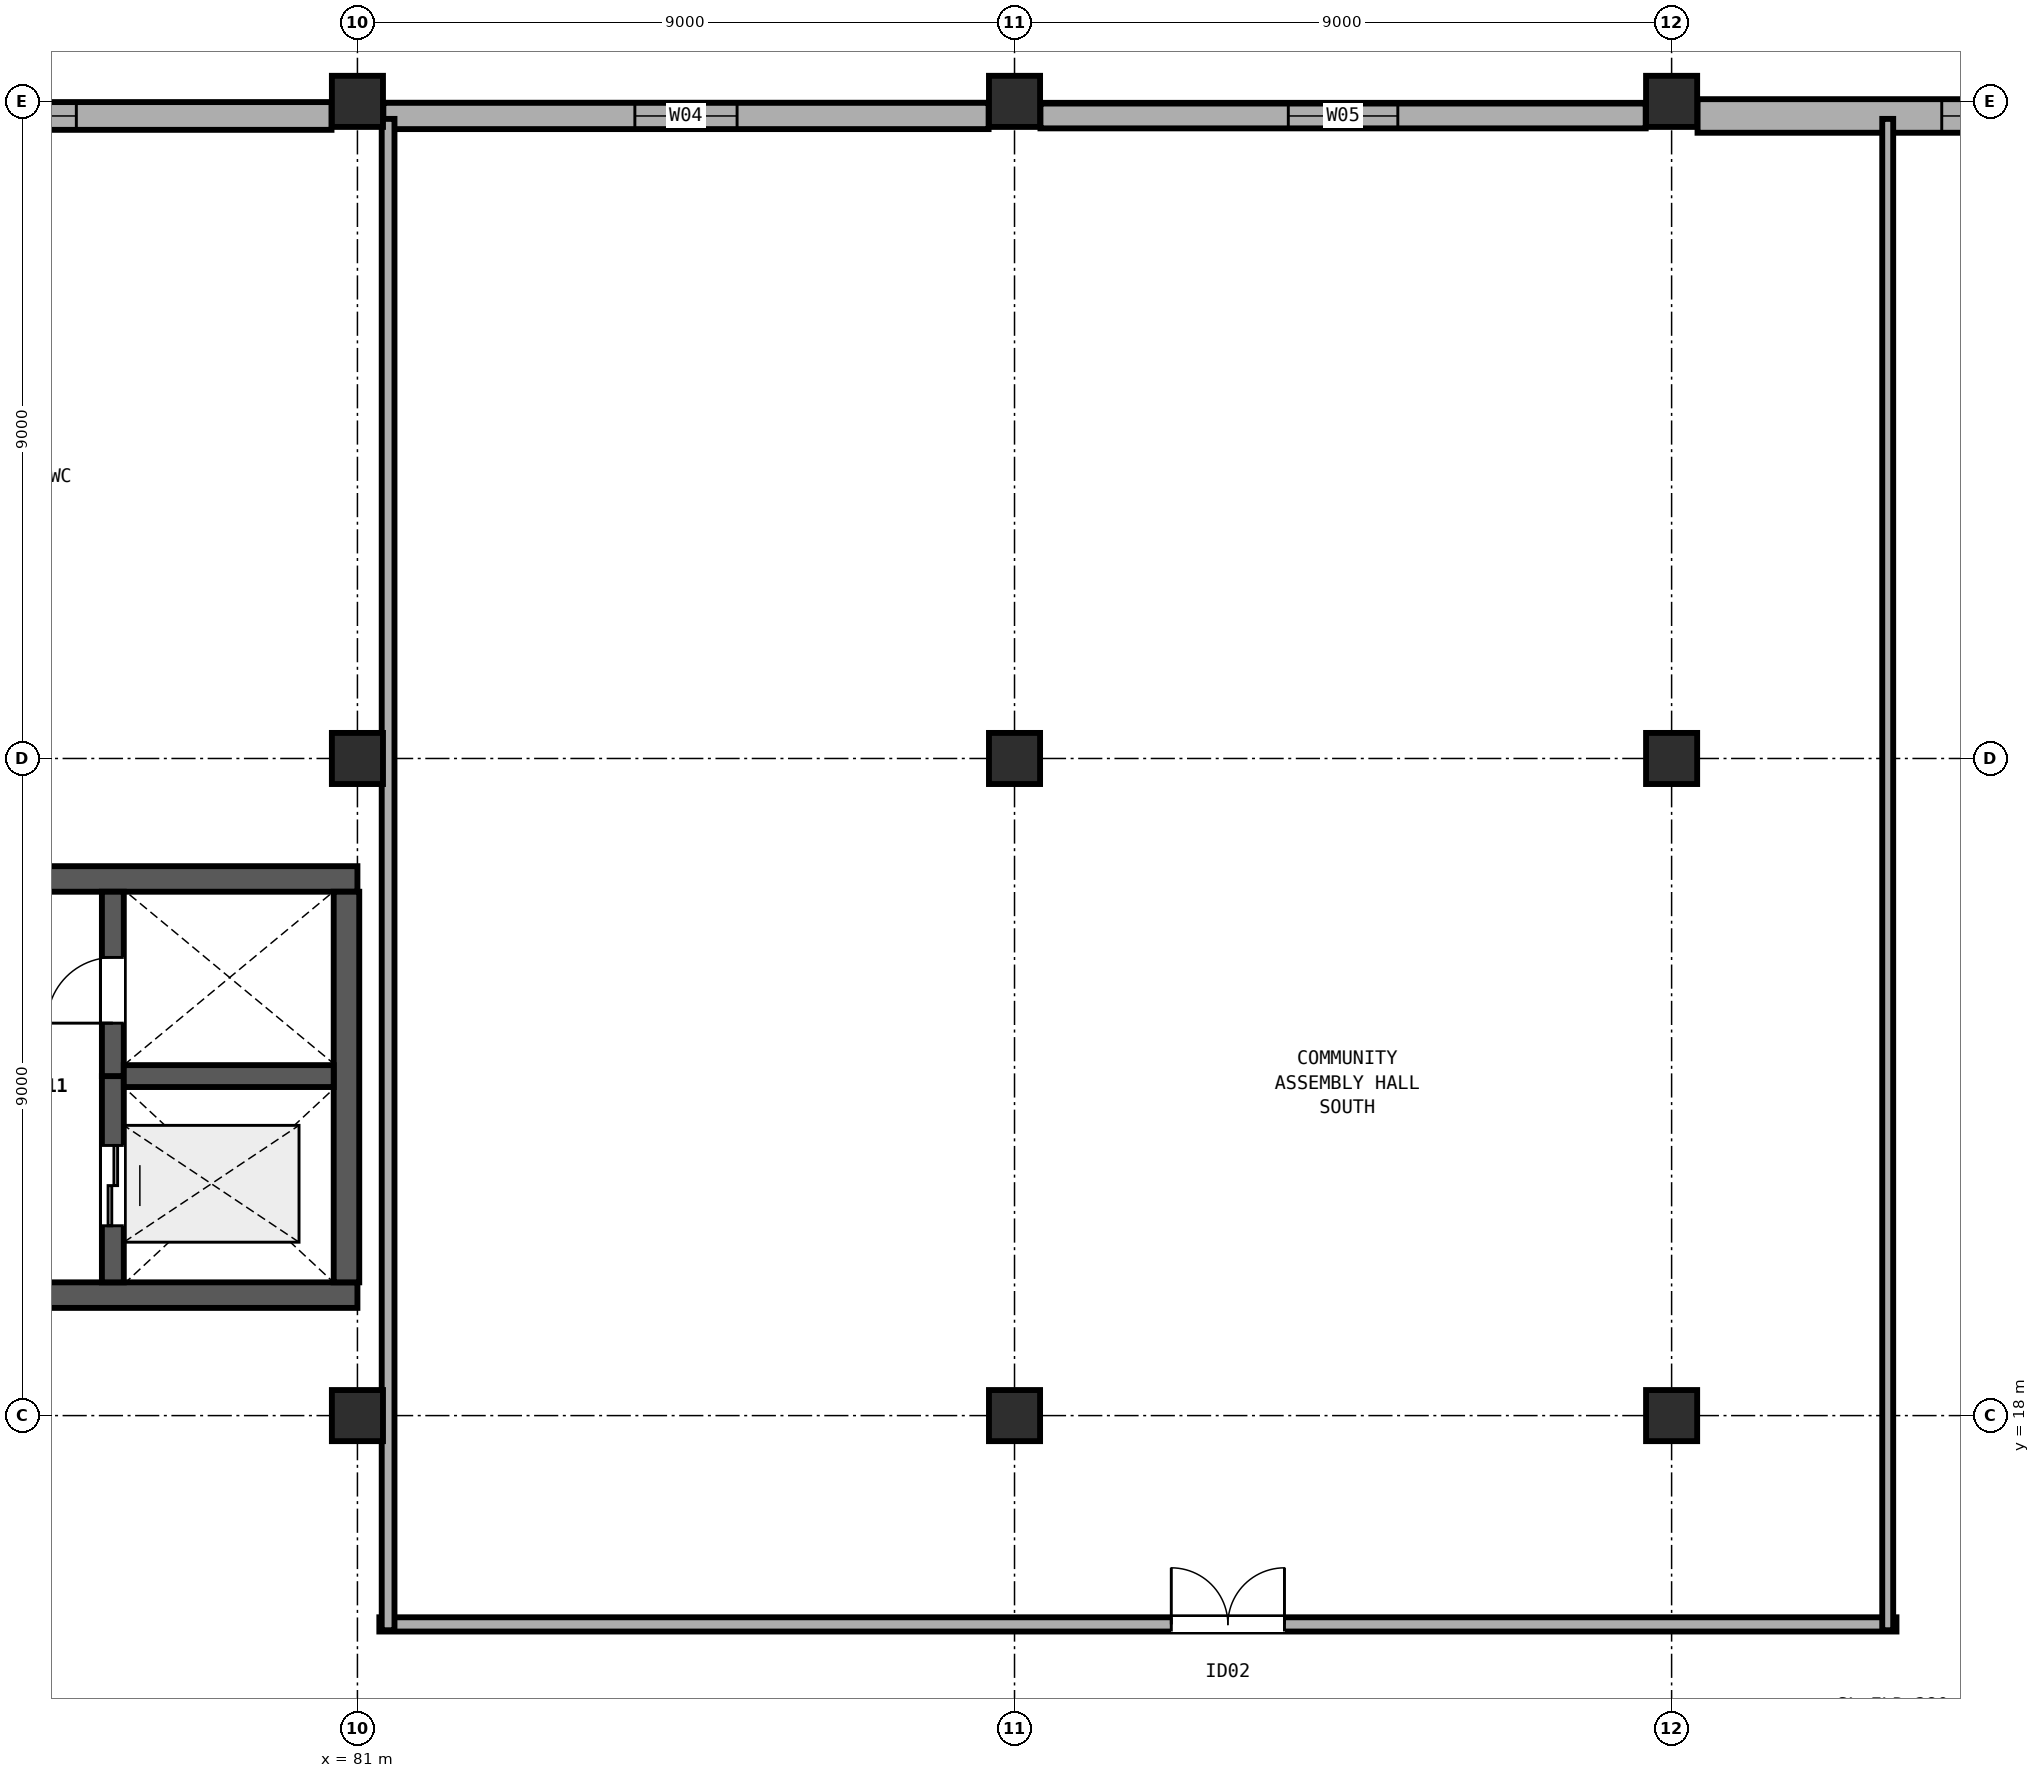
"""IFC4 building model, lengths in metres.
Left out: names, types, materials, properties, quantities, classifications, styles, units other than length and angle.
Written with IfcOpenShell. Run it as: python <this file> out.ifc"""

import sys

from ifc_helpers import new_model, si_unit, direction, frame, frame_2d, origin, origin_2d, place, context, subcontext, project, spatial, rectangle, extrude, element, fill, save


model = new_model("IFC4")
c1 = context("Model", 3, precision=1e-05, world=origin(), true_north=direction((0.0, 1.0)))
c2 = subcontext(c1, "Body", "Model", "MODEL_VIEW")
j1 = project(units=[si_unit("LENGTHUNIT", "METRE"), si_unit("PLANEANGLEUNIT", "RADIAN")], contexts=[c1])
p1 = place(None, origin())
s1 = spatial("IfcSite", under=j1, at=p1, CompositionType="ELEMENT")
p2 = place(p1, origin())
s2 = spatial("IfcBuilding", under=s1, at=p2, CompositionType="ELEMENT")
p3 = place(p2, frame((0.0, 0.0, 9.6)))
s3 = spatial("IfcBuildingStorey", under=s2, at=p3, CompositionType="ELEMENT", Elevation=9.6)
for number, where, z_axis, x_axis in (
    (1, (81.0, 18.0, 0.0), (0.0, 0.0, 1.0), (1.0, 0.0, 0.0)),
    (2, (81.0, 27.0, 0.0), (0.0, 0.0, 1.0), (1.0, 0.0, 0.0)),
    (3, (81.0, 36.0, 0.0), (0.0, 0.0, 1.0), (1.0, 0.0, 0.0)),
    (4, (90.0, 18.0, 0.0), (0.0, 0.0, 1.0), (1.0, 0.0, 0.0)),
    (5, (90.0, 27.0, 0.0), (0.0, 0.0, 1.0), (1.0, 0.0, 0.0)),
    (6, (90.0, 36.0, 0.0), (0.0, 0.0, 1.0), (1.0, 0.0, 0.0)),
    (7, (99.0, 18.0, 0.0), (0.0, 0.0, 1.0), (1.0, 0.0, 0.0)),
    (8, (99.0, 27.0, 0.0), (0.0, 0.0, 1.0), (1.0, 0.0, 0.0)),
    (9, (99.0, 36.0, 0.0), (0.0, 0.0, 1.0), (1.0, 0.0, 0.0)),
):
    element("IfcColumn", number, at=place(p3, frame(where, z_axis=z_axis, x_axis=x_axis)), inside=s3, PredefinedType="COLUMN", context=c2, shape_type="SweptSolid", body=[
        extrude(rectangle(XDim=0.7, YDim=0.7, at=origin_2d()), origin(), (0.0, 0.0, 1.0), 4.8),
    ])
p4 = place(p3, frame((63.0, 19.65, 0.0), z_axis=(0.0, 0.0, 1.0), x_axis=(1.0, 0.0, 0.0)))
e10 = element("IfcWall", 10, at=p4, inside=s3, PredefinedType="SHEAR", context=c2, shape_type="SweptSolid", body=[
    extrude(rectangle(XDim=18.0, YDim=0.35, at=frame_2d((9.0, 0.0))), origin(), (0.0, 0.0, 1.0), 4.5),
])
p5 = place(p4, frame((11.4, 0.0, 0.0)))
e11 = element("IfcOpeningElement", 11, at=p5, cuts=e10, PredefinedType="OPENING", context=c2, shape_type="SweptSolid", body=[
    extrude(rectangle(XDim=1.9, YDim=2.25, at=frame_2d((0.95, 1.125))), frame((0.0, 0.185, 0.0), z_axis=(0.0, -1.0, 0.0), x_axis=(1.0, 0.0, 0.0)), (0.0, 0.0, 1.0), 0.37),
])
p6 = place(p3, frame((81.0, 25.35, 0.0), z_axis=(0.0, 0.0, 1.0), x_axis=(-1.0, 0.0, 0.0)))
e12 = element("IfcWall", 12, at=p6, inside=s3, PredefinedType="SHEAR", context=c2, shape_type="SweptSolid", body=[
    extrude(rectangle(XDim=18.0, YDim=0.35, at=frame_2d((9.0, 0.0))), origin(), (0.0, 0.0, 1.0), 4.5),
])
p7 = place(p3, frame((80.85, 19.825, 0.0), z_axis=(0.0, 0.0, 1.0), x_axis=(0.0, 1.0, 0.0)))
e13 = element("IfcWall", 13, at=p7, inside=s3, PredefinedType="SHEAR", context=c2, shape_type="SweptSolid", body=[
    extrude(rectangle(XDim=5.35, YDim=0.35, at=frame_2d((2.675, 0.0))), origin(), (0.0, 0.0, 1.0), 4.5),
])
p8 = place(p3, frame((77.65, 19.825, 0.0), z_axis=(0.0, 0.0, 1.0), x_axis=(0.0, 1.0, 0.0)))
e14 = element("IfcWall", 14, at=p8, inside=s3, PredefinedType="SHEAR", context=c2, shape_type="SweptSolid", body=[
    extrude(rectangle(XDim=2.825, YDim=0.3, at=frame_2d((1.413, 0.0))), origin(), (0.0, 0.0, 1.0), 4.5),
])
p9 = place(p8, frame((0.775, 0.0, 0.0)))
e15 = element("IfcOpeningElement", 15, at=p9, cuts=e14, PredefinedType="OPENING", context=c2, shape_type="SweptSolid", body=[
    extrude(rectangle(XDim=1.1, YDim=2.1, at=frame_2d((0.55, 1.05))), frame((0.0, 0.16, 0.0), z_axis=(0.0, -1.0, 0.0), x_axis=(1.0, 0.0, 0.0)), (0.0, 0.0, 1.0), 0.32),
])
p10 = place(p3, frame((77.65, 22.65, 0.0), z_axis=(0.0, 0.0, 1.0), x_axis=(0.0, 1.0, 0.0)))
e16 = element("IfcWall", 16, at=p10, inside=s3, PredefinedType="SHEAR", context=c2, shape_type="SweptSolid", body=[
    extrude(rectangle(XDim=2.525, YDim=0.3, at=frame_2d((1.263, 0.0))), origin(), (0.0, 0.0, 1.0), 4.5),
])
p11 = place(p10, frame((0.725, 0.0, 0.0)))
e17 = element("IfcOpeningElement", 17, at=p11, cuts=e16, PredefinedType="OPENING", context=c2, shape_type="SweptSolid", body=[
    extrude(rectangle(XDim=0.9, YDim=2.1, at=frame_2d((0.45, 1.05))), frame((0.0, 0.16, 0.0), z_axis=(0.0, -1.0, 0.0), x_axis=(1.0, 0.0, 0.0)), (0.0, 0.0, 1.0), 0.32),
])
p12 = place(p3, frame((77.8, 22.65, 0.0), z_axis=(0.0, 0.0, 1.0), x_axis=(1.0, 0.0, 0.0)))
e18 = element("IfcWall", 18, at=p12, inside=s3, PredefinedType="SHEAR", context=c2, shape_type="SweptSolid", body=[
    extrude(rectangle(XDim=2.875, YDim=0.3, at=frame_2d((1.438, 0.0))), origin(), (0.0, 0.0, 1.0), 4.5),
])
p13 = place(p3, frame((72.355, 35.8, 0.0), z_axis=(0.0, 0.0, 1.0), x_axis=(1.0, 0.0, 0.0)))
e19 = element("IfcWall", 19, at=p13, inside=s3, PredefinedType="SOLIDWALL", context=c2, shape_type="SweptSolid", body=[
    extrude(rectangle(XDim=8.29, YDim=0.38, at=frame_2d((4.145, 0.0))), origin(), (0.0, 0.0, 1.0), 3.58),
])
p14 = place(p13, frame((3.495, 0.0, 0.9)))
e20 = element("IfcOpeningElement", 20, at=p14, cuts=e19, PredefinedType="OPENING", context=c2, shape_type="SweptSolid", body=[
    extrude(rectangle(XDim=1.3, YDim=1.5, at=frame_2d((0.65, 0.75))), frame((0.0, 0.2, 0.0), z_axis=(0.0, -1.0, 0.0), x_axis=(1.0, 0.0, 0.0)), (0.0, 0.0, 1.0), 0.4),
])
p15 = place(p3, frame((81.355, 35.8, 0.0), z_axis=(0.0, 0.0, 1.0), x_axis=(1.0, 0.0, 0.0)))
e21 = element("IfcWall", 21, at=p15, inside=s3, PredefinedType="SOLIDWALL", context=c2, shape_type="SweptSolid", body=[
    extrude(rectangle(XDim=8.29, YDim=0.36, at=frame_2d((4.145, 0.0))), origin(), (0.0, 0.0, 1.0), 3.58),
])
p16 = place(p15, frame((3.445, 0.0, 0.9)))
e22 = element("IfcOpeningElement", 22, at=p16, cuts=e21, PredefinedType="OPENING", context=c2, shape_type="SweptSolid", body=[
    extrude(rectangle(XDim=1.4, YDim=1.55, at=frame_2d((0.7, 0.775))), frame((0.0, 0.19, 0.0), z_axis=(0.0, -1.0, 0.0), x_axis=(1.0, 0.0, 0.0)), (0.0, 0.0, 1.0), 0.38),
])
p17 = place(p3, frame((90.355, 35.8, 0.0), z_axis=(0.0, 0.0, 1.0), x_axis=(1.0, 0.0, 0.0)))
e23 = element("IfcWall", 23, at=p17, inside=s3, PredefinedType="SOLIDWALL", context=c2, shape_type="SweptSolid", body=[
    extrude(rectangle(XDim=8.29, YDim=0.34, at=frame_2d((4.145, 0.0))), origin(), (0.0, 0.0, 1.0), 3.58),
])
p18 = place(p17, frame((3.395, 0.0, 0.9)))
e24 = element("IfcOpeningElement", 24, at=p18, cuts=e23, PredefinedType="OPENING", context=c2, shape_type="SweptSolid", body=[
    extrude(rectangle(XDim=1.5, YDim=1.6, at=frame_2d((0.75, 0.8))), frame((0.0, 0.18, 0.0), z_axis=(0.0, -1.0, 0.0), x_axis=(1.0, 0.0, 0.0)), (0.0, 0.0, 1.0), 0.36),
])
p19 = place(p3, frame((99.355, 35.8, 0.0), z_axis=(0.0, 0.0, 1.0), x_axis=(1.0, 0.0, 0.0)))
e25 = element("IfcWall", 25, at=p19, inside=s3, PredefinedType="SOLIDWALL", context=c2, shape_type="SweptSolid", body=[
    extrude(rectangle(XDim=8.29, YDim=0.46, at=frame_2d((4.145, 0.0))), origin(), (0.0, 0.0, 1.0), 3.58),
])
p20 = place(p19, frame((3.345, 0.0, 0.9)))
e26 = element("IfcOpeningElement", 26, at=p20, cuts=e25, PredefinedType="OPENING", context=c2, shape_type="SweptSolid", body=[
    extrude(rectangle(XDim=1.6, YDim=1.65, at=frame_2d((0.8, 0.825))), frame((0.0, 0.24, 0.0), z_axis=(0.0, -1.0, 0.0), x_axis=(1.0, 0.0, 0.0)), (0.0, 0.0, 1.0), 0.48),
])
p21 = place(p3, frame((81.3, 15.14, 0.0), z_axis=(0.0, 0.0, 1.0), x_axis=(1.0, 0.0, 0.0)))
e27 = element("IfcWall", 27, at=p21, inside=s3, PredefinedType="PARTITIONING", context=c2, shape_type="SweptSolid", body=[
    extrude(rectangle(XDim=20.78, YDim=0.195, at=frame_2d((10.39, 0.0))), origin(), (0.0, 0.0, 1.0), 3.56),
])
p22 = place(p21, frame((10.847, 0.0, 0.0)))
e28 = element("IfcOpeningElement", 28, at=p22, cuts=e27, PredefinedType="OPENING", context=c2, shape_type="SweptSolid", body=[
    extrude(rectangle(XDim=1.55, YDim=2.2, at=frame_2d((0.775, 1.1))), frame((0.0, 0.107, 0.0), z_axis=(0.0, -1.0, 0.0), x_axis=(1.0, 0.0, 0.0)), (0.0, 0.0, 1.0), 0.215),
])
p23 = place(p3, frame((81.42, 15.06, 0.0), z_axis=(0.0, 0.0, 1.0), x_axis=(0.0, 1.0, 0.0)))
e29 = element("IfcWall", 29, at=p23, inside=s3, PredefinedType="PARTITIONING", context=c2, shape_type="SweptSolid", body=[
    extrude(rectangle(XDim=20.7, YDim=0.175, at=frame_2d((10.35, 0.0))), origin(), (0.0, 0.0, 1.0), 3.56),
])
p24 = place(p3, frame((101.96, 35.76, 0.0), z_axis=(0.0, 0.0, 1.0), x_axis=(0.0, -1.0, 0.0)))
e30 = element("IfcWall", 30, at=p24, inside=s3, PredefinedType="PARTITIONING", context=c2, shape_type="SweptSolid", body=[
    extrude(rectangle(XDim=20.7, YDim=0.15, at=frame_2d((10.35, 0.0))), origin(), (0.0, 0.0, 1.0), 3.56),
])
p25 = place(p14, origin())
e31 = element("IfcWindow", 31, at=p25, inside=s3, PartitioningType="SINGLE_PANEL", PredefinedType="WINDOW", context=c2, shape_type="SweptSolid", body=[
    extrude(rectangle(XDim=1.3, YDim=1.5, at=frame_2d((0.65, 0.75))), frame((0.0, 0.03, 0.0), z_axis=(0.0, -1.0, 0.0), x_axis=(1.0, 0.0, 0.0)), (0.0, 0.0, 1.0), 0.06),
])
fill(e20, e31)
p26 = place(p16, origin())
e32 = element("IfcWindow", 32, at=p26, inside=s3, PartitioningType="SINGLE_PANEL", PredefinedType="WINDOW", context=c2, shape_type="SweptSolid", body=[
    extrude(rectangle(XDim=1.4, YDim=1.55, at=frame_2d((0.7, 0.775))), frame((0.0, 0.03, 0.0), z_axis=(0.0, -1.0, 0.0), x_axis=(1.0, 0.0, 0.0)), (0.0, 0.0, 1.0), 0.06),
])
fill(e22, e32)
p27 = place(p18, origin())
e33 = element("IfcWindow", 33, at=p27, inside=s3, PartitioningType="SINGLE_PANEL", PredefinedType="WINDOW", context=c2, shape_type="SweptSolid", body=[
    extrude(rectangle(XDim=1.5, YDim=1.6, at=frame_2d((0.75, 0.8))), frame((0.0, 0.03, 0.0), z_axis=(0.0, -1.0, 0.0), x_axis=(1.0, 0.0, 0.0)), (0.0, 0.0, 1.0), 0.06),
])
fill(e24, e33)
p28 = place(p20, origin())
e34 = element("IfcWindow", 34, at=p28, inside=s3, PartitioningType="SINGLE_PANEL", PredefinedType="WINDOW", context=c2, shape_type="SweptSolid", body=[
    extrude(rectangle(XDim=1.6, YDim=1.65, at=frame_2d((0.8, 0.825))), frame((0.0, 0.03, 0.0), z_axis=(0.0, -1.0, 0.0), x_axis=(1.0, 0.0, 0.0)), (0.0, 0.0, 1.0), 0.06),
])
fill(e26, e34)
p29 = place(p11, origin())
e35 = element("IfcDoor", 35, at=p29, inside=s3, OperationType="SINGLE_SWING_LEFT", PredefinedType="DOOR", context=c2, shape_type="SweptSolid", body=[
    extrude(rectangle(XDim=0.9, YDim=2.1, at=frame_2d((0.45, 1.05))), frame((0.0, 0.025, 0.0), z_axis=(0.0, -1.0, 0.0), x_axis=(1.0, 0.0, 0.0)), (0.0, 0.0, 1.0), 0.05),
])
fill(e17, e35)
p30 = place(p9, origin())
e36 = element("IfcDoor", 36, at=p30, inside=s3, OperationType="DOUBLE_DOOR_SLIDING", PredefinedType="DOOR", context=c2, shape_type="SweptSolid", body=[
    extrude(rectangle(XDim=1.1, YDim=2.1, at=frame_2d((0.55, 1.05))), frame((0.0, 0.025, 0.0), z_axis=(0.0, -1.0, 0.0), x_axis=(1.0, 0.0, 0.0)), (0.0, 0.0, 1.0), 0.05),
])
fill(e15, e36)
p31 = place(p22, origin())
e37 = element("IfcDoor", 37, at=p31, inside=s3, OperationType="DOUBLE_DOOR_SINGLE_SWING", PredefinedType="DOOR", context=c2, shape_type="SweptSolid", body=[
    extrude(rectangle(XDim=1.55, YDim=2.2, at=frame_2d((0.775, 1.1))), frame((0.0, 0.025, 0.0), z_axis=(0.0, -1.0, 0.0), x_axis=(1.0, 0.0, 0.0)), (0.0, 0.0, 1.0), 0.05),
])
fill(e28, e37)
save(model, sys.argv[1])
